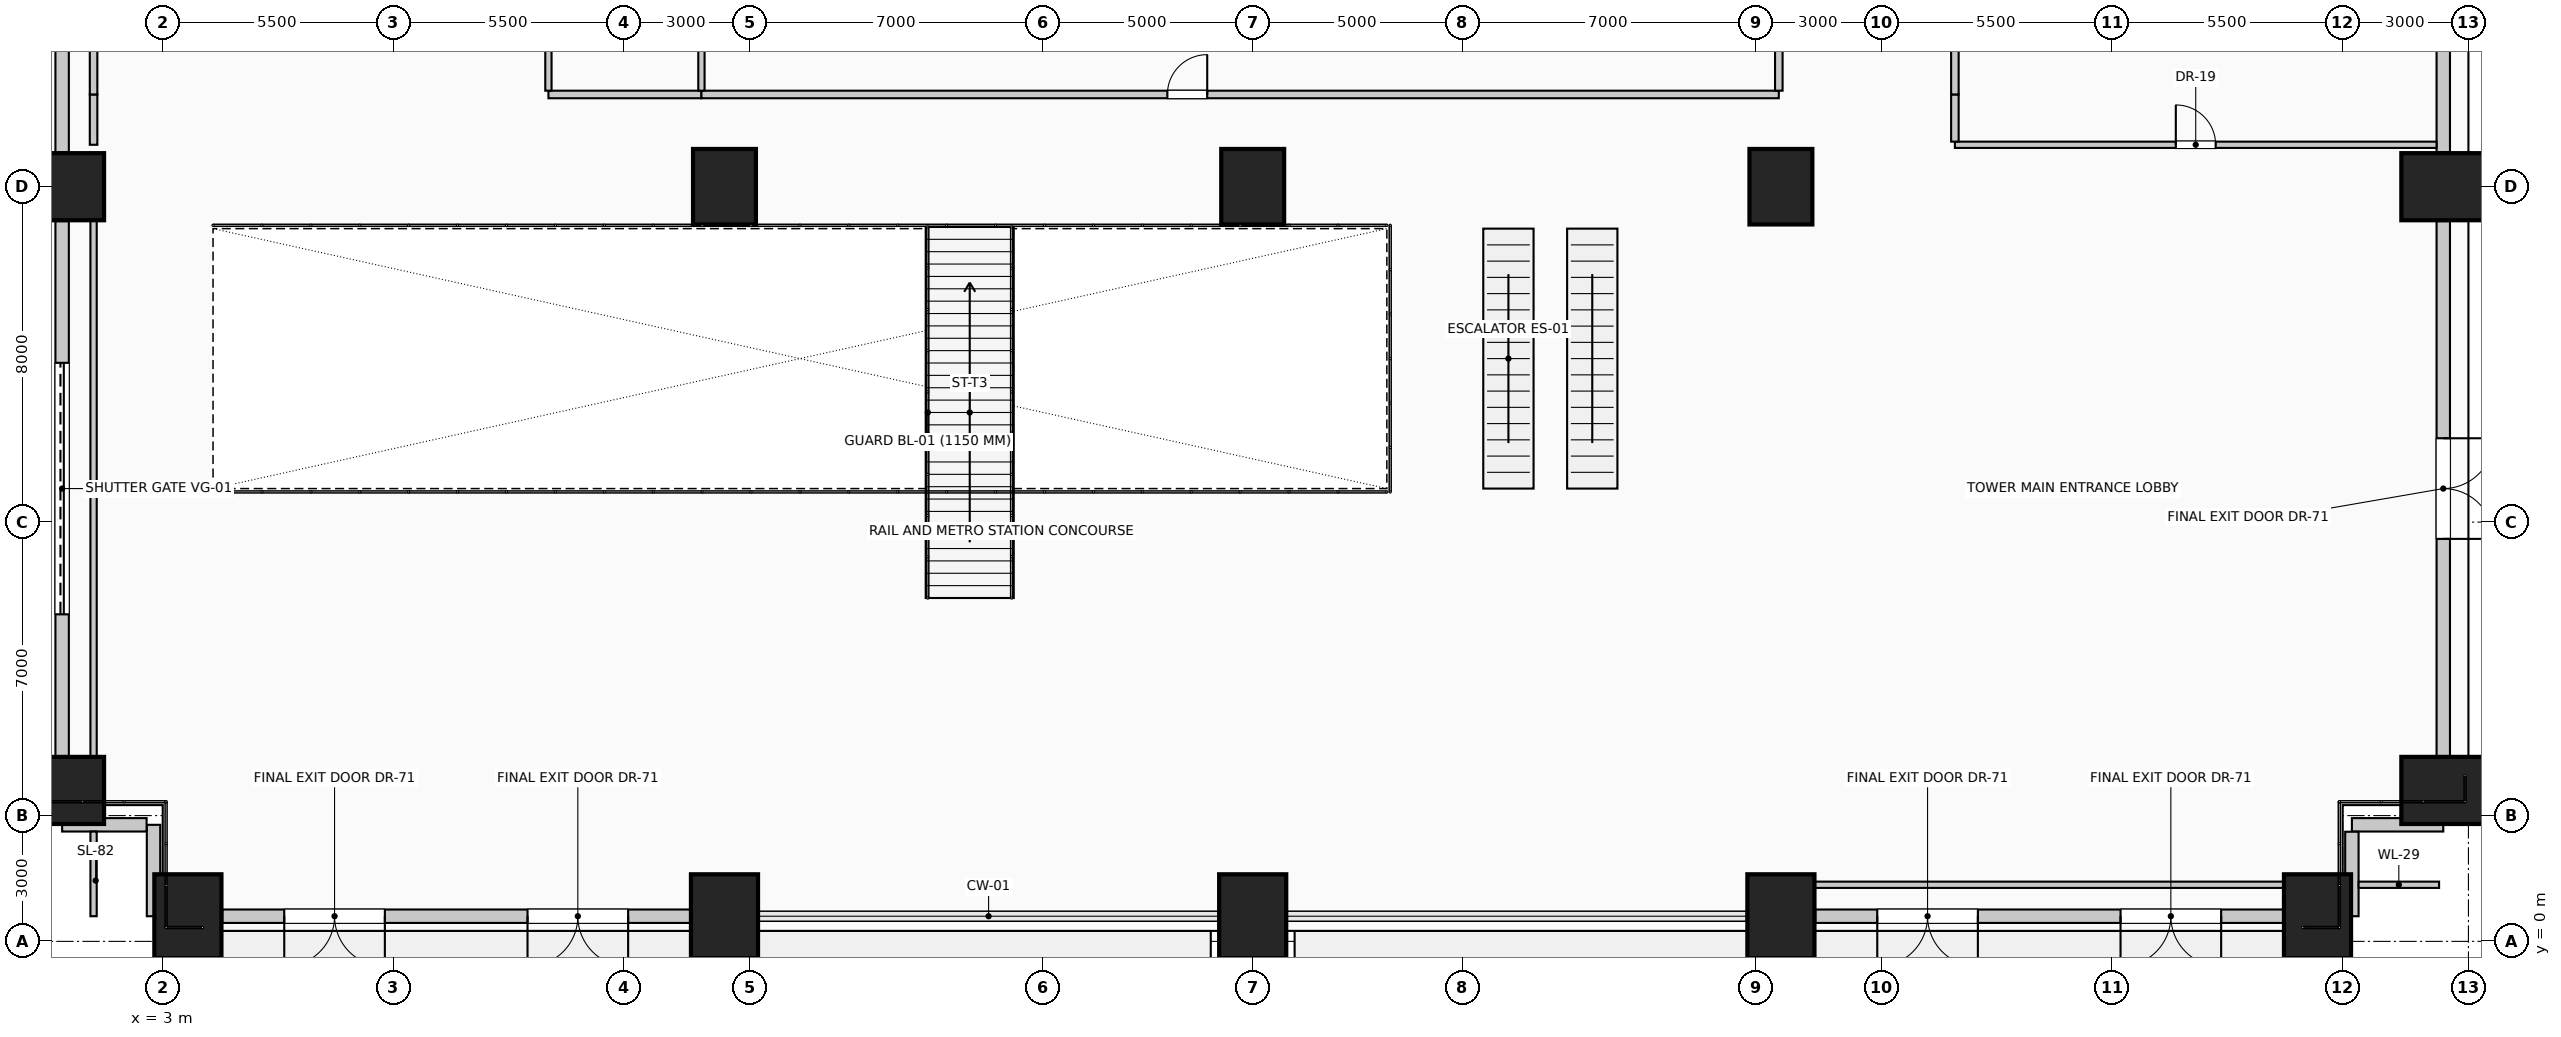
"""IFC4 building model, lengths in metres.
Left out: names, types, materials, properties, quantities, classifications, styles, units other than length and angle.
Written with IfcOpenShell. Run it as: python <this file> out.ifc"""

import sys

from ifc_helpers import new_model, si_unit, direction, frame, frame_2d, origin, origin_2d, place, context, subcontext, project, spatial, rectangle, extrude, element, fill, save


model = new_model("IFC4")
c1 = context("Model", 3, precision=1e-05, world=origin(), true_north=direction((0.0, 1.0)))
c2 = subcontext(c1, "Body", "Model", "MODEL_VIEW")
j1 = project(units=[si_unit("LENGTHUNIT", "METRE"), si_unit("PLANEANGLEUNIT", "RADIAN")], contexts=[c1])
p1 = place(None, origin())
s1 = spatial("IfcSite", under=j1, at=p1, CompositionType="ELEMENT")
p2 = place(p1, origin())
s2 = spatial("IfcBuilding", under=s1, at=p2, CompositionType="ELEMENT")
p3 = place(p2, origin())
s3 = spatial("IfcBuildingStorey", under=s2, at=p3, CompositionType="ELEMENT", Elevation=0.0)
for number, where, z_axis, x_axis in (
    (1, (3.6, 0.6, 0.0), (0.0, 0.0, 1.0), (1.0, 0.0, 0.0)),
    (2, (16.4, 0.6, 0.0), (0.0, 0.0, 1.0), (1.0, 0.0, 0.0)),
    (3, (29.0, 0.6, 0.0), (0.0, 0.0, 1.0), (1.0, 0.0, 0.0)),
    (4, (41.6, 0.6, 0.0), (0.0, 0.0, 1.0), (1.0, 0.0, 0.0)),
    (5, (54.4, 0.6, 0.0), (0.0, 0.0, 1.0), (1.0, 0.0, 0.0)),
    (6, (0.6, 3.6, 0.0), (0.0, 0.0, 1.0), (0.0, 1.0, 0.0)),
    (7, (57.4, 3.6, 0.0), (0.0, 0.0, 1.0), (0.0, 1.0, 0.0)),
    (8, (0.6, 18.0, 0.0), (0.0, 0.0, 1.0), (0.0, 1.0, 0.0)),
    (9, (57.4, 18.0, 0.0), (0.0, 0.0, 1.0), (0.0, 1.0, 0.0)),
):
    element("IfcColumn", number, at=place(p3, frame(where, z_axis=z_axis, x_axis=x_axis)), inside=s3, PredefinedType="COLUMN", context=c2, shape_type="SweptSolid", body=[
        extrude(rectangle(XDim=1.6, YDim=2.0, at=origin_2d()), origin(), (0.0, 0.0, 1.0), 5.4),
    ])
for number, where, z_axis, x_axis in (
    (10, (16.4, 18.0, 0.0), (0.0, 0.0, 1.0), (1.0, 0.0, 0.0)),
    (11, (29.0, 18.0, 0.0), (0.0, 0.0, 1.0), (1.0, 0.0, 0.0)),
    (12, (41.6, 18.0, 0.0), (0.0, 0.0, 1.0), (1.0, 0.0, 0.0)),
):
    element("IfcColumn", number, at=place(p3, frame(where, z_axis=z_axis, x_axis=x_axis)), inside=s3, PredefinedType="COLUMN", context=c2, shape_type="SweptSolid", body=[
        extrude(rectangle(XDim=1.5, YDim=1.8, at=origin_2d()), origin(), (0.0, 0.0, 1.0), 5.4),
    ])
p4 = place(p3, frame((15.58, 0.6, 0.0), z_axis=(0.0, 0.0, 1.0), x_axis=(-1.0, 0.0, 0.0)))
e13 = element("IfcWall", 13, at=p4, inside=s3, PredefinedType="SOLIDWALL", context=c2, shape_type="SweptSolid", body=[
    extrude(rectangle(XDim=11.16, YDim=0.32, at=frame_2d((5.58, 0.0))), origin(), (0.0, 0.0, 1.0), 4.05),
])
p5 = place(p4, frame((1.479, 0.0, 0.0)))
e14 = element("IfcOpeningElement", 14, at=p5, cuts=e13, PredefinedType="OPENING", context=c2, shape_type="SweptSolid", body=[
    extrude(rectangle(XDim=2.4, YDim=2.6, at=frame_2d((1.2, 1.3))), frame((0.0, 0.17, 0.0), z_axis=(0.0, -1.0, 0.0), x_axis=(1.0, 0.0, 0.0)), (0.0, 0.0, 1.0), 0.34),
])
p6 = place(p4, frame((7.281, 0.0, 0.0)))
e15 = element("IfcOpeningElement", 15, at=p6, cuts=e13, PredefinedType="OPENING", context=c2, shape_type="SweptSolid", body=[
    extrude(rectangle(XDim=2.4, YDim=2.6, at=frame_2d((1.2, 1.3))), frame((0.0, 0.17, 0.0), z_axis=(0.0, -1.0, 0.0), x_axis=(1.0, 0.0, 0.0)), (0.0, 0.0, 1.0), 0.34),
])
p7 = place(p3, frame((53.58, 0.6, 0.0), z_axis=(0.0, 0.0, 1.0), x_axis=(-1.0, 0.0, 0.0)))
e16 = element("IfcWall", 16, at=p7, inside=s3, PredefinedType="SOLIDWALL", context=c2, shape_type="SweptSolid", body=[
    extrude(rectangle(XDim=11.16, YDim=0.32, at=frame_2d((5.58, 0.0))), origin(), (0.0, 0.0, 1.0), 4.05),
])
p8 = place(p7, frame((1.479, 0.0, 0.0)))
e17 = element("IfcOpeningElement", 17, at=p8, cuts=e16, PredefinedType="OPENING", context=c2, shape_type="SweptSolid", body=[
    extrude(rectangle(XDim=2.4, YDim=2.6, at=frame_2d((1.2, 1.3))), frame((0.0, 0.17, 0.0), z_axis=(0.0, -1.0, 0.0), x_axis=(1.0, 0.0, 0.0)), (0.0, 0.0, 1.0), 0.34),
])
p9 = place(p7, frame((7.281, 0.0, 0.0)))
e18 = element("IfcOpeningElement", 18, at=p9, cuts=e16, PredefinedType="OPENING", context=c2, shape_type="SweptSolid", body=[
    extrude(rectangle(XDim=2.4, YDim=2.6, at=frame_2d((1.2, 1.3))), frame((0.0, 0.17, 0.0), z_axis=(0.0, -1.0, 0.0), x_axis=(1.0, 0.0, 0.0)), (0.0, 0.0, 1.0), 0.34),
])
p10 = place(p3, frame((0.6, 4.42, 0.0), z_axis=(0.0, 0.0, 1.0), x_axis=(0.0, 1.0, 0.0)))
e19 = element("IfcWall", 19, at=p10, inside=s3, PredefinedType="SOLIDWALL", context=c2, shape_type="SweptSolid", body=[
    extrude(rectangle(XDim=12.76, YDim=0.32, at=frame_2d((6.38, 0.0))), origin(), (0.0, 0.0, 1.0), 4.05),
])
p11 = place(p10, frame((3.38, 0.0, 0.0)))
e20 = element("IfcOpeningElement", 20, at=p11, cuts=e19, PredefinedType="OPENING", context=c2, shape_type="SweptSolid", body=[
    extrude(rectangle(XDim=6.0, YDim=3.2, at=frame_2d((3.0, 1.6))), frame((0.0, 0.17, 0.0), z_axis=(0.0, -1.0, 0.0), x_axis=(1.0, 0.0, 0.0)), (0.0, 0.0, 1.0), 0.34),
])
p12 = place(p3, frame((0.6, 18.82, 0.0), z_axis=(0.0, 0.0, 1.0), x_axis=(0.0, 1.0, 0.0)))
e21 = element("IfcWall", 21, at=p12, inside=s3, PredefinedType="SOLIDWALL", context=c2, shape_type="SweptSolid", body=[
    extrude(rectangle(XDim=14.36, YDim=0.32, at=frame_2d((7.18, 0.0))), origin(), (0.0, 0.0, 1.0), 4.05),
])
p13 = place(p3, frame((57.4, 17.18, 0.0), z_axis=(0.0, 0.0, 1.0), x_axis=(0.0, -1.0, 0.0)))
e22 = element("IfcWall", 22, at=p13, inside=s3, PredefinedType="SOLIDWALL", context=c2, shape_type="SweptSolid", body=[
    extrude(rectangle(XDim=12.76, YDim=0.32, at=frame_2d((6.38, 0.0))), origin(), (0.0, 0.0, 1.0), 4.05),
])
p14 = place(p13, frame((5.18, 0.0, 0.0)))
e23 = element("IfcOpeningElement", 23, at=p14, cuts=e22, PredefinedType="OPENING", context=c2, shape_type="SweptSolid", body=[
    extrude(rectangle(XDim=2.4, YDim=2.6, at=frame_2d((1.2, 1.3))), frame((0.0, 0.17, 0.0), z_axis=(0.0, -1.0, 0.0), x_axis=(1.0, 0.0, 0.0)), (0.0, 0.0, 1.0), 0.34),
])
p15 = place(p3, frame((57.4, 33.18, 0.0), z_axis=(0.0, 0.0, 1.0), x_axis=(0.0, -1.0, 0.0)))
e24 = element("IfcWall", 24, at=p15, inside=s3, PredefinedType="SOLIDWALL", context=c2, shape_type="SweptSolid", body=[
    extrude(rectangle(XDim=14.36, YDim=0.32, at=frame_2d((7.18, 0.0))), origin(), (0.0, 0.0, 1.0), 4.05),
])
p16 = place(p15, frame((5.08, 0.0, 0.0)))
e25 = element("IfcOpeningElement", 25, at=p16, cuts=e24, PredefinedType="OPENING", context=c2, shape_type="SweptSolid", body=[
    extrude(rectangle(XDim=4.2, YDim=3.4, at=frame_2d((2.1, 1.7))), frame((0.0, 0.17, 0.0), z_axis=(0.0, -1.0, 0.0), x_axis=(1.0, 0.0, 0.0)), (0.0, 0.0, 1.0), 0.34),
])
p17 = place(p3, frame((57.4, 2.78, 0.0), z_axis=(0.0, 0.0, 1.0), x_axis=(-1.0, 0.0, 0.0)))
e26 = element("IfcWall", 26, at=p17, inside=s3, PredefinedType="SOLIDWALL", context=c2, shape_type="SweptSolid", body=[
    extrude(rectangle(XDim=2.18, YDim=0.32, at=frame_2d((1.09, 0.0))), origin(), (0.0, 0.0, 1.0), 5.0),
])
p18 = place(p3, frame((55.22, 2.615, 0.0), z_axis=(0.0, 0.0, 1.0), x_axis=(0.0, -1.0, 0.0)))
e27 = element("IfcWall", 27, at=p18, inside=s3, PredefinedType="SOLIDWALL", context=c2, shape_type="SweptSolid", body=[
    extrude(rectangle(XDim=2.015, YDim=0.32, at=frame_2d((1.007, 0.0))), origin(), (0.0, 0.0, 1.0), 5.0),
])
p19 = place(p3, frame((2.78, 0.6, 0.0), z_axis=(0.0, 0.0, 1.0), x_axis=(0.0, 1.0, 0.0)))
e28 = element("IfcWall", 28, at=p19, inside=s3, PredefinedType="SOLIDWALL", context=c2, shape_type="SweptSolid", body=[
    extrude(rectangle(XDim=2.18, YDim=0.32, at=frame_2d((1.09, 0.0))), origin(), (0.0, 0.0, 1.0), 5.0),
])
p20 = place(p3, frame((2.615, 2.78, 0.0), z_axis=(0.0, 0.0, 1.0), x_axis=(-1.0, 0.0, 0.0)))
e29 = element("IfcWall", 29, at=p20, inside=s3, PredefinedType="SOLIDWALL", context=c2, shape_type="SweptSolid", body=[
    extrude(rectangle(XDim=2.015, YDim=0.32, at=frame_2d((1.007, 0.0))), origin(), (0.0, 0.0, 1.0), 5.0),
])
p21 = place(p3, frame((42.4, 1.35, 0.0), z_axis=(0.0, 0.0, 1.0), x_axis=(1.0, 0.0, 0.0)))
e30 = element("IfcWall", 30, at=p21, inside=s3, PredefinedType="PARTITIONING", context=c2, shape_type="SweptSolid", body=[
    extrude(rectangle(XDim=11.2, YDim=0.15, at=frame_2d((5.6, 0.0))), origin(), (0.0, 0.0, 1.0), 5.0),
])
p22 = place(p3, frame((55.38, 1.35, 0.0), z_axis=(0.0, 0.0, 1.0), x_axis=(1.0, 0.0, 0.0)))
e31 = element("IfcWall", 31, at=p22, inside=s3, PredefinedType="PARTITIONING", context=c2, shape_type="SweptSolid", body=[
    extrude(rectangle(XDim=1.92, YDim=0.15, at=frame_2d((0.96, 0.0))), origin(), (0.0, 0.0, 1.0), 5.0),
])
p23 = place(p3, frame((45.75, 19.0, 0.0), z_axis=(0.0, 0.0, 1.0), x_axis=(1.0, 0.0, 0.0)))
e32 = element("IfcWall", 32, at=p23, inside=s3, PredefinedType="PARTITIONING", context=c2, shape_type="SweptSolid", body=[
    extrude(rectangle(XDim=11.49, YDim=0.15, at=frame_2d((5.745, 0.0))), origin(), (0.0, 0.0, 1.0), 5.0),
])
p24 = place(p23, frame((5.27, 0.0, 0.0)))
e33 = element("IfcOpeningElement", 33, at=p24, cuts=e32, PredefinedType="OPENING", context=c2, shape_type="SweptSolid", body=[
    extrude(rectangle(XDim=0.95, YDim=2.15, at=frame_2d((0.475, 1.075))), frame((0.0, 0.085, 0.0), z_axis=(0.0, -1.0, 0.0), x_axis=(1.0, 0.0, 0.0)), (0.0, 0.0, 1.0), 0.17),
])
p25 = place(p3, frame((12.2, 20.2, 0.0), z_axis=(0.0, 0.0, 1.0), x_axis=(1.0, 0.0, 0.0)))
e34 = element("IfcWall", 34, at=p25, inside=s3, PredefinedType="PARTITIONING", context=c2, shape_type="SweptSolid", body=[
    extrude(rectangle(XDim=3.65, YDim=0.18, at=frame_2d((1.825, 0.0))), origin(), (0.0, 0.0, 1.0), 5.0),
])
p26 = place(p3, frame((15.85, 20.2, 0.0), z_axis=(0.0, 0.0, 1.0), x_axis=(1.0, 0.0, 0.0)))
e35 = element("IfcWall", 35, at=p26, inside=s3, PredefinedType="PARTITIONING", context=c2, shape_type="SweptSolid", body=[
    extrude(rectangle(XDim=25.7, YDim=0.18, at=frame_2d((12.85, 0.0))), origin(), (0.0, 0.0, 1.0), 5.0),
])
p27 = place(p26, frame((11.115, 0.0, 0.0)))
e36 = element("IfcOpeningElement", 36, at=p27, cuts=e35, PredefinedType="OPENING", context=c2, shape_type="SweptSolid", body=[
    extrude(rectangle(XDim=0.95, YDim=2.15, at=frame_2d((0.475, 1.075))), frame((0.0, 0.1, 0.0), z_axis=(0.0, -1.0, 0.0), x_axis=(1.0, 0.0, 0.0)), (0.0, 0.0, 1.0), 0.2),
])
p28 = place(p3, frame((1.35, 0.6, 0.0), z_axis=(0.0, 0.0, 1.0), x_axis=(0.0, 1.0, 0.0)))
e37 = element("IfcWall", 37, at=p28, inside=s3, PredefinedType="PARTITIONING", context=c2, shape_type="SweptSolid", body=[
    extrude(rectangle(XDim=2.02, YDim=0.15, at=frame_2d((1.01, 0.0))), origin(), (0.0, 0.0, 1.0), 5.0),
])
p29 = place(p3, frame((1.35, 4.4, 0.0), z_axis=(0.0, 0.0, 1.0), x_axis=(0.0, 1.0, 0.0)))
e38 = element("IfcWall", 38, at=p29, inside=s3, PredefinedType="PARTITIONING", context=c2, shape_type="SweptSolid", body=[
    extrude(rectangle(XDim=12.8, YDim=0.15, at=frame_2d((6.4, 0.0))), origin(), (0.0, 0.0, 1.0), 5.0),
])
p30 = place(p3, frame((1.35, 19.0, 0.0), z_axis=(0.0, 0.0, 1.0), x_axis=(0.0, 1.0, 0.0)))
e39 = element("IfcWall", 39, at=p30, inside=s3, PredefinedType="PARTITIONING", context=c2, shape_type="SweptSolid", body=[
    extrude(rectangle(XDim=1.2, YDim=0.18, at=frame_2d((0.6, 0.0))), origin(), (0.0, 0.0, 1.0), 5.0),
])
p31 = place(p3, frame((1.35, 20.2, 0.0), z_axis=(0.0, 0.0, 1.0), x_axis=(0.0, 1.0, 0.0)))
e40 = element("IfcWall", 40, at=p31, inside=s3, PredefinedType="PARTITIONING", context=c2, shape_type="SweptSolid", body=[
    extrude(rectangle(XDim=12.04, YDim=0.18, at=frame_2d((6.02, 0.0))), origin(), (0.0, 0.0, 1.0), 5.0),
])
p32 = place(p3, frame((12.2, 20.29, 0.0), z_axis=(0.0, 0.0, 1.0), x_axis=(0.0, 1.0, 0.0)))
e41 = element("IfcWall", 41, at=p32, inside=s3, PredefinedType="PARTITIONING", context=c2, shape_type="SweptSolid", body=[
    extrude(rectangle(XDim=1.81, YDim=0.15, at=frame_2d((0.905, 0.0))), origin(), (0.0, 0.0, 1.0), 5.0),
])
p33 = place(p3, frame((15.85, 20.29, 0.0), z_axis=(0.0, 0.0, 1.0), x_axis=(0.0, 1.0, 0.0)))
e42 = element("IfcWall", 42, at=p33, inside=s3, PredefinedType="PARTITIONING", context=c2, shape_type="SweptSolid", body=[
    extrude(rectangle(XDim=4.51, YDim=0.15, at=frame_2d((2.255, 0.0))), origin(), (0.0, 0.0, 1.0), 5.0),
])
p34 = place(p3, frame((41.55, 20.29, 0.0), z_axis=(0.0, 0.0, 1.0), x_axis=(0.0, 1.0, 0.0)))
e43 = element("IfcWall", 43, at=p34, inside=s3, PredefinedType="PARTITIONING", context=c2, shape_type="SweptSolid", body=[
    extrude(rectangle(XDim=12.06, YDim=0.18, at=frame_2d((6.03, 0.0))), origin(), (0.0, 0.0, 1.0), 4.045),
])
p35 = place(p3, frame((45.75, 19.075, 0.0), z_axis=(0.0, 0.0, 1.0), x_axis=(0.0, 1.0, 0.0)))
e44 = element("IfcWall", 44, at=p35, inside=s3, PredefinedType="PARTITIONING", context=c2, shape_type="SweptSolid", body=[
    extrude(rectangle(XDim=1.125, YDim=0.18, at=frame_2d((0.562, 0.0))), origin(), (0.0, 0.0, 1.0), 5.0),
])
p36 = place(p3, frame((45.75, 20.2, 0.0), z_axis=(0.0, 0.0, 1.0), x_axis=(0.0, 1.0, 0.0)))
e45 = element("IfcWall", 45, at=p36, inside=s3, PredefinedType="PARTITIONING", context=c2, shape_type="SweptSolid", body=[
    extrude(rectangle(XDim=7.325, YDim=0.18, at=frame_2d((3.663, 0.0))), origin(), (0.0, 0.0, 1.0), 5.0),
])
p37 = place(p5, origin())
e46 = element("IfcDoor", 46, at=p37, inside=s3, OperationType="DOUBLE_DOOR_SINGLE_SWING", PredefinedType="DOOR", context=c2, shape_type="SweptSolid", body=[
    extrude(rectangle(XDim=2.4, YDim=2.6, at=frame_2d((1.2, 1.3))), frame((0.0, 0.025, 0.0), z_axis=(0.0, -1.0, 0.0), x_axis=(1.0, 0.0, 0.0)), (0.0, 0.0, 1.0), 0.05),
])
fill(e14, e46)
p38 = place(p6, origin())
e47 = element("IfcDoor", 47, at=p38, inside=s3, OperationType="DOUBLE_DOOR_SINGLE_SWING", PredefinedType="DOOR", context=c2, shape_type="SweptSolid", body=[
    extrude(rectangle(XDim=2.4, YDim=2.6, at=frame_2d((1.2, 1.3))), frame((0.0, 0.025, 0.0), z_axis=(0.0, -1.0, 0.0), x_axis=(1.0, 0.0, 0.0)), (0.0, 0.0, 1.0), 0.05),
])
fill(e15, e47)
p39 = place(p8, origin())
e48 = element("IfcDoor", 48, at=p39, inside=s3, OperationType="DOUBLE_DOOR_SINGLE_SWING", PredefinedType="DOOR", context=c2, shape_type="SweptSolid", body=[
    extrude(rectangle(XDim=2.4, YDim=2.6, at=frame_2d((1.2, 1.3))), frame((0.0, 0.025, 0.0), z_axis=(0.0, -1.0, 0.0), x_axis=(1.0, 0.0, 0.0)), (0.0, 0.0, 1.0), 0.05),
])
fill(e17, e48)
p40 = place(p9, origin())
e49 = element("IfcDoor", 49, at=p40, inside=s3, OperationType="DOUBLE_DOOR_SINGLE_SWING", PredefinedType="DOOR", context=c2, shape_type="SweptSolid", body=[
    extrude(rectangle(XDim=2.4, YDim=2.6, at=frame_2d((1.2, 1.3))), frame((0.0, 0.025, 0.0), z_axis=(0.0, -1.0, 0.0), x_axis=(1.0, 0.0, 0.0)), (0.0, 0.0, 1.0), 0.05),
])
fill(e18, e49)
p41 = place(p11, origin())
e50 = element("IfcDoor", 50, at=p41, inside=s3, OperationType="ROLLINGUP", PredefinedType="GATE", context=c2, shape_type="SweptSolid", body=[
    extrude(rectangle(XDim=6.0, YDim=3.2, at=frame_2d((3.0, 1.6))), frame((0.0, 0.025, 0.0), z_axis=(0.0, -1.0, 0.0), x_axis=(1.0, 0.0, 0.0)), (0.0, 0.0, 1.0), 0.05),
])
fill(e20, e50)
p42 = place(p14, origin())
e51 = element("IfcDoor", 51, at=p42, inside=s3, OperationType="DOUBLE_DOOR_SINGLE_SWING", PredefinedType="DOOR", context=c2, shape_type="SweptSolid", body=[
    extrude(rectangle(XDim=2.4, YDim=2.6, at=frame_2d((1.2, 1.3))), frame((0.0, 0.025, 0.0), z_axis=(0.0, -1.0, 0.0), x_axis=(1.0, 0.0, 0.0)), (0.0, 0.0, 1.0), 0.05),
])
fill(e23, e51)
p43 = place(p24, origin())
e52 = element("IfcDoor", 52, at=p43, inside=s3, OperationType="SINGLE_SWING_LEFT", PredefinedType="DOOR", context=c2, shape_type="SweptSolid", body=[
    extrude(rectangle(XDim=0.95, YDim=2.15, at=frame_2d((0.475, 1.075))), frame((0.0, 0.025, 0.0), z_axis=(0.0, -1.0, 0.0), x_axis=(1.0, 0.0, 0.0)), (0.0, 0.0, 1.0), 0.05),
])
fill(e33, e52)
p44 = place(p27, origin())
e53 = element("IfcDoor", 53, at=p44, inside=s3, OperationType="SINGLE_SWING_RIGHT", PredefinedType="DOOR", context=c2, shape_type="SweptSolid", body=[
    extrude(rectangle(XDim=0.95, YDim=2.15, at=frame_2d((0.475, 1.075))), frame((0.0, 0.025, 0.0), z_axis=(0.0, -1.0, 0.0), x_axis=(1.0, 0.0, 0.0)), (0.0, 0.0, 1.0), 0.05),
])
fill(e36, e53)
save(model, sys.argv[1])
